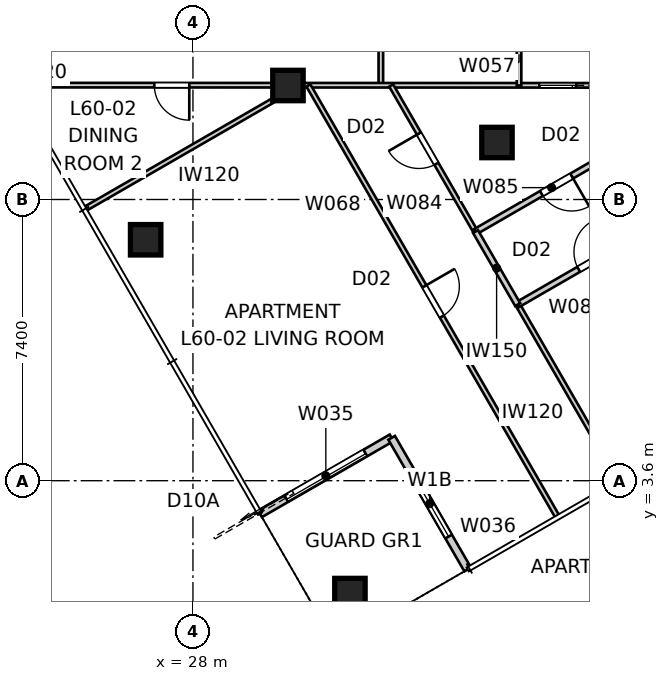
"""IFC4 building model, lengths in metres.
Left out: names, types, materials, properties, quantities, classifications, styles, units other than length and angle.
Written with IfcOpenShell. Run it as: python <this file> out.ifc"""

import sys

from ifc_helpers import new_model, si_unit, direction, frame, frame_2d, origin, origin_2d, place, context, subcontext, project, spatial, rectangle, extrude, element, fill, save


model = new_model("IFC4")
c1 = context("Model", 3, precision=1e-05, world=origin(), true_north=direction((0.0, 1.0)))
c2 = subcontext(c1, "Body", "Model", "MODEL_VIEW")
j1 = project(units=[si_unit("LENGTHUNIT", "METRE"), si_unit("PLANEANGLEUNIT", "RADIAN")], contexts=[c1])
p1 = place(None, origin())
s1 = spatial("IfcSite", under=j1, at=p1, CompositionType="ELEMENT")
p2 = place(p1, origin())
s2 = spatial("IfcBuilding", under=s1, at=p2, CompositionType="ELEMENT")
p3 = place(p2, frame((0.0, 0.0, 218.4)))
s3 = spatial("IfcBuildingStorey", under=s2, at=p3, CompositionType="ELEMENT", Elevation=218.4)
for number, where, z_axis, x_axis in (
    (1, (32.13, 0.63, 0.0), (0.0, 0.0, 1.0), (1.0, 0.0, 0.0)),
    (2, (26.755, 9.94, 0.0), (0.0, 0.0, 1.0), (1.0, 0.0, 0.0)),
    (3, (30.5, 14.0, 0.0), (0.0, 0.0, 1.0), (1.0, 0.0, 0.0)),
    (4, (36.0, 12.5, 0.0), (0.0, 0.0, 1.0), (1.0, 0.0, 0.0)),
):
    element("IfcColumn", number, at=place(p3, frame(where, z_axis=z_axis, x_axis=x_axis)), inside=s3, PredefinedType="COLUMN", context=c2, shape_type="SweptSolid", body=[
        extrude(rectangle(XDim=0.8, YDim=0.8, at=origin_2d()), origin(), (0.0, 0.0, 1.0), 3.4),
    ])
p4 = place(p3, frame((29.764, 2.729, 0.0), z_axis=(0.0, 0.0, 1.0), x_axis=(0.866026010844, 0.49999894854, 0.0)))
e5 = element("IfcWall", 5, at=p4, inside=s3, PredefinedType="SOLIDWALL", context=c2, shape_type="SweptSolid", body=[
    extrude(rectangle(XDim=4.0, YDim=0.2, at=frame_2d((2.0, 0.0))), origin(), (0.0, 0.0, 1.0), 3.25),
])
p5 = place(p4, frame((0.8, 0.0, 0.0)))
e6 = element("IfcOpeningElement", 6, at=p5, cuts=e5, PredefinedType="OPENING", context=c2, shape_type="SweptSolid", body=[
    extrude(rectangle(XDim=2.4, YDim=2.1, at=frame_2d((1.2, 1.05))), frame((0.0, 0.11, 0.0), z_axis=(0.0, -1.0, 0.0), x_axis=(1.0, 0.0, 0.0)), (0.0, 0.0, 1.0), 0.22),
])
p6 = place(p3, frame((33.229, 4.729, 0.0), z_axis=(0.0, 0.0, 1.0), x_axis=(0.49999894854, -0.866026010844, 0.0)))
e7 = element("IfcWall", 7, at=p6, inside=s3, PredefinedType="SOLIDWALL", context=c2, shape_type="SweptSolid", body=[
    extrude(rectangle(XDim=4.0, YDim=0.2, at=frame_2d((2.0, 0.0))), origin(), (0.0, 0.0, 1.0), 3.25),
])
p7 = place(p6, frame((1.0, 0.0, 0.45)))
e8 = element("IfcOpeningElement", 8, at=p7, cuts=e7, PredefinedType="OPENING", context=c2, shape_type="SweptSolid", body=[
    extrude(rectangle(XDim=2.0, YDim=1.8, at=frame_2d((1.0, 0.9))), frame((0.0, 0.11, 0.0), z_axis=(0.0, -1.0, 0.0), x_axis=(1.0, 0.0, 0.0)), (0.0, 0.0, 1.0), 0.22),
])
p8 = place(p3, frame((32.944, 17.9, 0.0), z_axis=(0.0, 0.0, 1.0), x_axis=(0.0, -1.0, 0.0)))
e9 = element("IfcWall", 9, at=p8, inside=s3, PredefinedType="PARTITIONING", context=c2, shape_type="SweptSolid", body=[
    extrude(rectangle(XDim=3.9, YDim=0.12, at=frame_2d((1.95, 0.0))), origin(), (0.0, 0.0, 1.0), 3.25),
])
p9 = place(p8, frame((1.849, 0.0, 0.0)))
e10 = element("IfcOpeningElement", 10, at=p9, cuts=e9, PredefinedType="OPENING", context=c2, shape_type="SweptSolid", body=[
    extrude(rectangle(XDim=0.92, YDim=2.34, at=frame_2d((0.46, 1.17))), frame((0.0, 0.07, 0.0), z_axis=(0.0, -1.0, 0.0), x_axis=(1.0, 0.0, 0.0)), (0.0, 0.0, 1.0), 0.14),
])
p10 = place(p3, frame((51.757, 14.0, 0.0), z_axis=(0.0, 0.0, 1.0), x_axis=(-0.999999938148, 0.000351716958, 0.0)))
e11 = element("IfcWall", 11, at=p10, inside=s3, PredefinedType="PARTITIONING", context=c2, shape_type="SweptSolid", body=[
    extrude(rectangle(XDim=28.46, YDim=0.12, at=frame_2d((14.23, 0.0))), origin(), (0.0, 0.0, 1.0), 2.55),
])
p11 = place(p10, frame((3.82, 0.0, 0.0)))
e12 = element("IfcOpeningElement", 12, at=p11, cuts=e11, PredefinedType="OPENING", context=c2, shape_type="SweptSolid", body=[
    extrude(rectangle(XDim=0.92, YDim=2.34, at=frame_2d((0.46, 1.17))), frame((0.0, 0.07, 0.0), z_axis=(0.0, -1.0, 0.0), x_axis=(1.0, 0.0, 0.0)), (0.0, 0.0, 1.0), 0.14),
])
p12 = place(p10, frame((9.17, 0.0, 0.0)))
e13 = element("IfcOpeningElement", 13, at=p12, cuts=e11, PredefinedType="OPENING", context=c2, shape_type="SweptSolid", body=[
    extrude(rectangle(XDim=0.96, YDim=2.1, at=frame_2d((0.48, 1.05))), frame((0.0, 0.07, 0.0), z_axis=(0.0, -1.0, 0.0), x_axis=(1.0, 0.0, 0.0)), (0.0, 0.0, 1.0), 0.14),
])
p13 = place(p10, frame((13.68, 0.0, 0.0)))
e14 = element("IfcOpeningElement", 14, at=p13, cuts=e11, PredefinedType="OPENING", context=c2, shape_type="SweptSolid", body=[
    extrude(rectangle(XDim=0.96, YDim=2.1, at=frame_2d((0.48, 1.05))), frame((0.0, 0.07, 0.0), z_axis=(0.0, -1.0, 0.0), x_axis=(1.0, 0.0, 0.0)), (0.0, 0.0, 1.0), 0.14),
])
p14 = place(p10, frame((23.854, 0.0, 0.0)))
e15 = element("IfcOpeningElement", 15, at=p14, cuts=e11, PredefinedType="OPENING", context=c2, shape_type="SweptSolid", body=[
    extrude(rectangle(XDim=0.92, YDim=2.34, at=frame_2d((0.46, 1.17))), frame((0.0, 0.07, 0.0), z_axis=(0.0, -1.0, 0.0), x_axis=(1.0, 0.0, 0.0)), (0.0, 0.0, 1.0), 0.14),
])
p15 = place(p3, frame((36.581, 14.0, 0.0), z_axis=(0.0, 0.0, 1.0), x_axis=(0.0, 1.0, 0.0)))
e16 = element("IfcWall", 16, at=p15, inside=s3, PredefinedType="PARTITIONING", context=c2, shape_type="SweptSolid", body=[
    extrude(rectangle(XDim=3.9, YDim=0.12, at=frame_2d((1.95, 0.0))), origin(), (0.0, 0.0, 1.0), 3.25),
])
p16 = place(p15, frame((1.47, 0.0, 0.0)))
e17 = element("IfcOpeningElement", 17, at=p16, cuts=e16, PredefinedType="OPENING", context=c2, shape_type="SweptSolid", body=[
    extrude(rectangle(XDim=0.96, YDim=2.1, at=frame_2d((0.48, 1.05))), frame((0.0, 0.07, 0.0), z_axis=(0.0, -1.0, 0.0), x_axis=(1.0, 0.0, 0.0)), (0.0, 0.0, 1.0), 0.14),
])
p17 = place(p3, frame((31.039, 14.0, 0.0), z_axis=(0.0, 0.0, 1.0), x_axis=(0.500006184843, -0.866021832934, 0.0)))
e18 = element("IfcWall", 18, at=p17, inside=s3, PredefinedType="PARTITIONING", context=c2, shape_type="SweptSolid", body=[
    extrude(rectangle(XDim=13.084, YDim=0.12, at=frame_2d((6.542, 0.0))), origin(), (0.0, 0.0, 1.0), 3.25),
])
p18 = place(p17, frame((6.102, 0.0, 0.0)))
e19 = element("IfcOpeningElement", 19, at=p18, cuts=e18, PredefinedType="OPENING", context=c2, shape_type="SweptSolid", body=[
    extrude(rectangle(XDim=0.92, YDim=2.34, at=frame_2d((0.46, 1.17))), frame((0.0, 0.07, 0.0), z_axis=(0.0, -1.0, 0.0), x_axis=(1.0, 0.0, 0.0)), (0.0, 0.0, 1.0), 0.14),
])
p19 = place(p3, frame((25.174, 10.759, 0.0), z_axis=(0.0, 0.0, 1.0), x_axis=(0.866023120914, 0.500003954026, 0.0)))
e20 = element("IfcWall", 20, at=p19, inside=s3, PredefinedType="PARTITIONING", context=c2, shape_type="SweptSolid", body=[
    extrude(rectangle(XDim=6.481, YDim=0.12, at=frame_2d((3.241, 0.0))), origin(), (0.0, 0.0, 1.0), 3.25),
])
p20 = place(p3, frame((39.214, 3.612, 0.0), z_axis=(0.0, 0.0, 1.0), x_axis=(-0.499995631649, 0.866027925839, 0.0)))
e21 = element("IfcWall", 21, at=p20, inside=s3, PredefinedType="PARTITIONING", context=c2, shape_type="SweptSolid", body=[
    extrude(rectangle(XDim=5.338, YDim=0.12, at=frame_2d((2.669, 0.0))), origin(), (0.0, 0.0, 1.0), 3.25),
])
p21 = place(p3, frame((36.545, 8.234, 0.0), z_axis=(0.0, 0.0, 1.0), x_axis=(0.866025598446, 0.499999662836, 0.0)))
e22 = element("IfcWall", 22, at=p21, inside=s3, PredefinedType="SOLIDWALL", context=c2, shape_type="SweptSolid", body=[
    extrude(rectangle(XDim=4.625, YDim=0.15, at=frame_2d((2.312, 0.0))), origin(), (0.0, 0.0, 1.0), 3.25),
])
p22 = place(p21, frame((1.853, 0.0, 0.0)))
e23 = element("IfcOpeningElement", 23, at=p22, cuts=e22, PredefinedType="OPENING", context=c2, shape_type="SweptSolid", body=[
    extrude(rectangle(XDim=0.92, YDim=2.34, at=frame_2d((0.46, 1.17))), frame((0.0, 0.085, 0.0), z_axis=(0.0, -1.0, 0.0), x_axis=(1.0, 0.0, 0.0)), (0.0, 0.0, 1.0), 0.17),
])
p23 = place(p3, frame((35.435, 10.156, 0.0), z_axis=(0.0, 0.0, 1.0), x_axis=(-0.499966886051, 0.866044521288, 0.0)))
e24 = element("IfcWall", 24, at=p23, inside=s3, PredefinedType="PARTITIONING", context=c2, shape_type="SweptSolid", body=[
    extrude(rectangle(XDim=4.438, YDim=0.12, at=frame_2d((2.219, 0.0))), origin(), (0.0, 0.0, 1.0), 3.25),
])
p24 = place(p23, frame((2.059, 0.0, 0.0)))
e25 = element("IfcOpeningElement", 25, at=p24, cuts=e24, PredefinedType="OPENING", context=c2, shape_type="SweptSolid", body=[
    extrude(rectangle(XDim=0.92, YDim=2.34, at=frame_2d((0.46, 1.17))), frame((0.0, 0.07, 0.0), z_axis=(0.0, -1.0, 0.0), x_axis=(1.0, 0.0, 0.0)), (0.0, 0.0, 1.0), 0.14),
])
p25 = place(p3, frame((39.441, 12.469, 0.0), z_axis=(0.0, 0.0, 1.0), x_axis=(-0.866025598446, -0.499999662836, 0.0)))
e26 = element("IfcWall", 26, at=p25, inside=s3, PredefinedType="SOLIDWALL", context=c2, shape_type="SweptSolid", body=[
    extrude(rectangle(XDim=4.625, YDim=0.15, at=frame_2d((2.312, 0.0))), origin(), (0.0, 0.0, 1.0), 3.25),
])
p26 = place(p25, frame((1.702, 0.0, 0.0)))
e27 = element("IfcOpeningElement", 27, at=p26, cuts=e26, PredefinedType="OPENING", context=c2, shape_type="SweptSolid", body=[
    extrude(rectangle(XDim=0.92, YDim=2.34, at=frame_2d((0.46, 1.17))), frame((0.0, 0.085, 0.0), z_axis=(0.0, -1.0, 0.0), x_axis=(1.0, 0.0, 0.0)), (0.0, 0.0, 1.0), 0.17),
])
p27 = place(p3, frame((35.435, 10.156, 0.0), z_axis=(0.0, 0.0, 1.0), x_axis=(0.500008142102, -0.866020702889, 0.0)))
e28 = element("IfcWall", 28, at=p27, inside=s3, PredefinedType="SOLIDWALL", context=c2, shape_type="SweptSolid", body=[
    extrude(rectangle(XDim=2.219, YDim=0.15, at=frame_2d((1.11, 0.0))), origin(), (0.0, 0.0, 1.0), 3.25),
])
p28 = place(p5, origin())
e29 = element("IfcDoor", 29, at=p28, inside=s3, OperationType="SLIDING_TO_LEFT", PredefinedType="DOOR", context=c2, shape_type="SweptSolid", body=[
    extrude(rectangle(XDim=2.4, YDim=2.1, at=frame_2d((1.2, 1.05))), frame((0.0, 0.025, 0.0), z_axis=(0.0, -1.0, 0.0), x_axis=(1.0, 0.0, 0.0)), (0.0, 0.0, 1.0), 0.05),
])
fill(e6, e29)
p29 = place(p7, origin())
e30 = element("IfcWindow", 30, at=p29, inside=s3, PartitioningType="SINGLE_PANEL", PredefinedType="WINDOW", context=c2, shape_type="SweptSolid", body=[
    extrude(rectangle(XDim=2.0, YDim=1.8, at=frame_2d((1.0, 0.9))), frame((0.0, 0.03, 0.0), z_axis=(0.0, -1.0, 0.0), x_axis=(1.0, 0.0, 0.0)), (0.0, 0.0, 1.0), 0.06),
])
fill(e8, e30)
p30 = place(p13, origin())
e31 = element("IfcDoor", 31, at=p30, inside=s3, OperationType="SLIDING_TO_LEFT", PredefinedType="DOOR", context=c2, shape_type="SweptSolid", body=[
    extrude(rectangle(XDim=0.96, YDim=2.1, at=frame_2d((0.48, 1.05))), frame((0.0, 0.025, 0.0), z_axis=(0.0, -1.0, 0.0), x_axis=(1.0, 0.0, 0.0)), (0.0, 0.0, 1.0), 0.05),
])
fill(e14, e31)
p31 = place(p26, origin())
e32 = element("IfcDoor", 32, at=p31, inside=s3, OperationType="SINGLE_SWING_LEFT", PredefinedType="DOOR", context=c2, shape_type="SweptSolid", body=[
    extrude(rectangle(XDim=0.92, YDim=2.34, at=frame_2d((0.46, 1.17))), frame((0.0, 0.025, 0.0), z_axis=(0.0, -1.0, 0.0), x_axis=(1.0, 0.0, 0.0)), (0.0, 0.0, 1.0), 0.05),
])
fill(e27, e32)
p32 = place(p24, origin())
e33 = element("IfcDoor", 33, at=p32, inside=s3, OperationType="SINGLE_SWING_RIGHT", PredefinedType="DOOR", context=c2, shape_type="SweptSolid", body=[
    extrude(rectangle(XDim=0.92, YDim=2.34, at=frame_2d((0.46, 1.17))), frame((0.0, 0.025, 0.0), z_axis=(0.0, -1.0, 0.0), x_axis=(1.0, 0.0, 0.0)), (0.0, 0.0, 1.0), 0.05),
])
fill(e25, e33)
p33 = place(p14, origin())
e34 = element("IfcDoor", 34, at=p33, inside=s3, OperationType="SINGLE_SWING_LEFT", PredefinedType="DOOR", context=c2, shape_type="SweptSolid", body=[
    extrude(rectangle(XDim=0.92, YDim=2.34, at=frame_2d((0.46, 1.17))), frame((0.0, 0.025, 0.0), z_axis=(0.0, -1.0, 0.0), x_axis=(1.0, 0.0, 0.0)), (0.0, 0.0, 1.0), 0.05),
])
fill(e15, e34)
p34 = place(p22, origin())
e35 = element("IfcDoor", 35, at=p34, inside=s3, OperationType="SINGLE_SWING_RIGHT", PredefinedType="DOOR", context=c2, shape_type="SweptSolid", body=[
    extrude(rectangle(XDim=0.92, YDim=2.34, at=frame_2d((0.46, 1.17))), frame((0.0, 0.025, 0.0), z_axis=(0.0, -1.0, 0.0), x_axis=(1.0, 0.0, 0.0)), (0.0, 0.0, 1.0), 0.05),
])
fill(e23, e35)
p35 = place(p18, origin())
e36 = element("IfcDoor", 36, at=p35, inside=s3, OperationType="SINGLE_SWING_LEFT", PredefinedType="DOOR", context=c2, shape_type="SweptSolid", body=[
    extrude(rectangle(XDim=0.92, YDim=2.34, at=frame_2d((0.46, 1.17))), frame((0.0, 0.025, 0.0), z_axis=(0.0, -1.0, 0.0), x_axis=(1.0, 0.0, 0.0)), (0.0, 0.0, 1.0), 0.05),
])
fill(e19, e36)
save(model, sys.argv[1])
